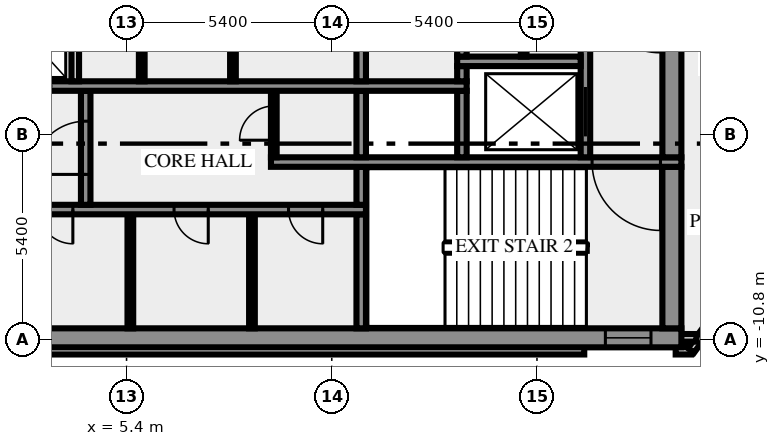
"""IFC4 building model, lengths in metres.
Left out: names, types, materials, properties, quantities, classifications, styles, units other than length and angle.
Written with IfcOpenShell. Run it as: python <this file> out.ifc"""

import sys

from ifc_helpers import new_model, si_unit, direction, frame, frame_2d, origin, place, context, subcontext, project, spatial, rectangle, extrude, element, fill, save


model = new_model("IFC4")
c1 = context("Model", 3, precision=1e-05, world=origin(), true_north=direction((0.0, 1.0)))
c2 = subcontext(c1, "Body", "Model", "MODEL_VIEW")
j1 = project(units=[si_unit("LENGTHUNIT", "METRE"), si_unit("PLANEANGLEUNIT", "RADIAN")], contexts=[c1])
p1 = place(None, origin())
s1 = spatial("IfcSite", under=j1, at=p1, CompositionType="ELEMENT")
p2 = place(p1, origin())
s2 = spatial("IfcBuilding", under=s1, at=p2, CompositionType="ELEMENT")
p3 = place(p2, frame((0.0, 0.0, 319.0)))
s3 = spatial("IfcBuildingStorey", under=s2, at=p3, CompositionType="ELEMENT", Elevation=319.0)
p4 = place(p3, frame((-17.444, -11.088, 0.0), z_axis=(0.0, 0.0, 1.0), x_axis=(1.0, 0.0, 0.0)))
e1 = element("IfcWall", 1, at=p4, inside=s3, PredefinedType="SOLIDWALL", context=c2, shape_type="SweptSolid", body=[
    extrude(rectangle(XDim=34.888, YDim=0.2, at=frame_2d((17.444, 0.0))), origin(), (0.0, 0.0, 1.0), 3.65),
])
p5 = place(p3, frame((19.85, -11.088, 0.0), z_axis=(0.0, 0.0, 1.0), x_axis=(1.0, 0.0, 0.0)))
e2 = element("IfcWall", 2, at=p5, inside=s3, PredefinedType="SOLIDWALL", context=c2, shape_type="SweptSolid", body=[
    extrude(rectangle(XDim=0.406, YDim=0.2, at=frame_2d((0.203, 0.0))), origin(), (0.0, 0.0, 1.0), 3.65),
])
p6 = place(p3, frame((20.253, -11.083, 0.0), z_axis=(0.0, 0.0, 1.0), x_axis=(0.587766567315, 0.809030569476, 0.0)))
e3 = element("IfcWall", 3, at=p6, inside=s3, PredefinedType="SOLIDWALL", context=c2, shape_type="SweptSolid", body=[
    extrude(rectangle(XDim=2.688, YDim=0.2, at=frame_2d((1.344, 0.0))), origin(), (0.0, 0.0, 1.0), 3.65),
])
p7 = place(p3, frame((19.98, -10.75, 0.0), z_axis=(0.0, 0.0, 1.0), x_axis=(1.0, 0.0, 0.0)))
e4 = element("IfcWall", 4, at=p7, inside=s3, PredefinedType="SOLIDWALL", context=c2, shape_type="SweptSolid", body=[
    extrude(rectangle(XDim=0.417, YDim=0.2, at=frame_2d((0.208, 0.0))), origin(), (0.0, 0.0, 1.0), 3.65),
])
p8 = place(p3, frame((-20.0, -10.75, 0.0), z_axis=(0.0, 0.0, 1.0), x_axis=(1.0, 0.0, 0.0)))
e5 = element("IfcWall", 5, at=p8, inside=s3, PredefinedType="SHEAR", context=c2, shape_type="SweptSolid", body=[
    extrude(rectangle(XDim=40.0, YDim=0.5, at=frame_2d((20.0, 0.0))), origin(), (0.0, 0.0, 1.0), 3.65),
])
p9 = place(p8, frame((0.8, 0.0, 1.0)))
e6 = element("IfcOpeningElement", 6, at=p9, cuts=e5, PredefinedType="OPENING", context=c2, shape_type="SweptSolid", body=[
    extrude(rectangle(XDim=1.2, YDim=1.2, at=frame_2d((0.6, 0.6))), frame((0.0, 0.26, 0.0), z_axis=(0.0, -1.0, 0.0), x_axis=(1.0, 0.0, 0.0)), (0.0, 0.0, 1.0), 0.52),
])
p10 = place(p8, frame((38.0, 0.0, 1.0)))
e7 = element("IfcOpeningElement", 7, at=p10, cuts=e5, PredefinedType="OPENING", context=c2, shape_type="SweptSolid", body=[
    extrude(rectangle(XDim=1.2, YDim=1.2, at=frame_2d((0.6, 0.6))), frame((0.0, 0.26, 0.0), z_axis=(0.0, -1.0, 0.0), x_axis=(1.0, 0.0, 0.0)), (0.0, 0.0, 1.0), 0.52),
])
for number, where, z_axis, x_axis in (
    (8, (5.5, -10.5, 0.0), (0.0, 0.0, 1.0), (0.0, 1.0, 0.0)),
    (9, (8.7, -10.5, 0.0), (0.0, 0.0, 1.0), (0.0, 1.0, 0.0)),
):
    element("IfcWall", number, at=place(p3, frame(where, z_axis=z_axis, x_axis=x_axis)), inside=s3, PredefinedType="PARTITIONING", context=c2, shape_type="SweptSolid", body=[
        extrude(rectangle(XDim=3.0, YDim=0.15, at=frame_2d((1.5, 0.0))), origin(), (0.0, 0.0, 1.0), 3.65),
    ])
p11 = place(p3, frame((11.575, -10.5, 0.0), z_axis=(0.0, 0.0, 1.0), x_axis=(0.0, 1.0, 0.0)))
e10 = element("IfcWall", 10, at=p11, inside=s3, PredefinedType="SHEAR", context=c2, shape_type="SweptSolid", body=[
    extrude(rectangle(XDim=3.0, YDim=0.25, at=frame_2d((1.5, 0.0))), origin(), (0.0, 0.0, 1.0), 3.65),
])
p12 = place(p3, frame((19.75, -10.5, 0.0), z_axis=(0.0, 0.0, 1.0), x_axis=(0.0, 1.0, 0.0)))
e11 = element("IfcWall", 11, at=p12, inside=s3, PredefinedType="SHEAR", context=c2, shape_type="SweptSolid", body=[
    extrude(rectangle(XDim=4.25, YDim=0.5, at=frame_2d((2.125, 0.0))), origin(), (0.0, 0.0, 1.0), 3.65),
])
p13 = place(p3, frame((11.7, -7.375, 0.0), z_axis=(0.0, 0.0, 1.0), x_axis=(-1.0, 0.0, 0.0)))
e12 = element("IfcWall", 12, at=p13, inside=s3, PredefinedType="SHEAR", context=c2, shape_type="SweptSolid", body=[
    extrude(rectangle(XDim=23.4, YDim=0.25, at=frame_2d((11.7, 0.0))), origin(), (0.0, 0.0, 1.0), 3.65),
])
p14 = place(p13, frame((22.225, 0.0, 0.0)))
e13 = element("IfcOpeningElement", 13, at=p14, cuts=e12, PredefinedType="OPENING", context=c2, shape_type="SweptSolid", body=[
    extrude(rectangle(XDim=0.8, YDim=2.1, at=frame_2d((0.4, 1.05))), frame((0.0, 0.135, 0.0), z_axis=(0.0, -1.0, 0.0), x_axis=(1.0, 0.0, 0.0)), (0.0, 0.0, 1.0), 0.27),
])
p15 = place(p13, frame((20.2, 0.0, 0.0)))
e14 = element("IfcOpeningElement", 14, at=p15, cuts=e12, PredefinedType="OPENING", context=c2, shape_type="SweptSolid", body=[
    extrude(rectangle(XDim=1.1, YDim=2.1, at=frame_2d((0.55, 1.05))), frame((0.0, 0.135, 0.0), z_axis=(0.0, -1.0, 0.0), x_axis=(1.0, 0.0, 0.0)), (0.0, 0.0, 1.0), 0.27),
])
p16 = place(p13, frame((17.7, 0.0, 0.0)))
e15 = element("IfcOpeningElement", 15, at=p16, cuts=e12, PredefinedType="OPENING", context=c2, shape_type="SweptSolid", body=[
    extrude(rectangle(XDim=1.1, YDim=2.1, at=frame_2d((0.55, 1.05))), frame((0.0, 0.135, 0.0), z_axis=(0.0, -1.0, 0.0), x_axis=(1.0, 0.0, 0.0)), (0.0, 0.0, 1.0), 0.27),
])
p17 = place(p13, frame((15.975, 0.0, 0.0)))
e16 = element("IfcOpeningElement", 16, at=p17, cuts=e12, PredefinedType="OPENING", context=c2, shape_type="SweptSolid", body=[
    extrude(rectangle(XDim=0.8, YDim=2.1, at=frame_2d((0.4, 1.05))), frame((0.0, 0.135, 0.0), z_axis=(0.0, -1.0, 0.0), x_axis=(1.0, 0.0, 0.0)), (0.0, 0.0, 1.0), 0.27),
])
p18 = place(p13, frame((14.5, 0.0, 0.0)))
e17 = element("IfcOpeningElement", 17, at=p18, cuts=e12, PredefinedType="OPENING", context=c2, shape_type="SweptSolid", body=[
    extrude(rectangle(XDim=0.9, YDim=2.1, at=frame_2d((0.45, 1.05))), frame((0.0, 0.135, 0.0), z_axis=(0.0, -1.0, 0.0), x_axis=(1.0, 0.0, 0.0)), (0.0, 0.0, 1.0), 0.27),
])
p19 = place(p13, frame((12.95, 0.0, 0.0)))
e18 = element("IfcOpeningElement", 18, at=p19, cuts=e12, PredefinedType="OPENING", context=c2, shape_type="SweptSolid", body=[
    extrude(rectangle(XDim=0.9, YDim=2.1, at=frame_2d((0.45, 1.05))), frame((0.0, 0.135, 0.0), z_axis=(0.0, -1.0, 0.0), x_axis=(1.0, 0.0, 0.0)), (0.0, 0.0, 1.0), 0.27),
])
p20 = place(p13, frame((11.475, 0.0, 0.0)))
e19 = element("IfcOpeningElement", 19, at=p20, cuts=e12, PredefinedType="OPENING", context=c2, shape_type="SweptSolid", body=[
    extrude(rectangle(XDim=0.9, YDim=2.1, at=frame_2d((0.45, 1.05))), frame((0.0, 0.135, 0.0), z_axis=(0.0, -1.0, 0.0), x_axis=(1.0, 0.0, 0.0)), (0.0, 0.0, 1.0), 0.27),
])
p21 = place(p13, frame((10.45, 0.0, 0.0)))
e20 = element("IfcOpeningElement", 20, at=p21, cuts=e12, PredefinedType="OPENING", context=c2, shape_type="SweptSolid", body=[
    extrude(rectangle(XDim=0.5, YDim=2.1, at=frame_2d((0.25, 1.05))), frame((0.0, 0.135, 0.0), z_axis=(0.0, -1.0, 0.0), x_axis=(1.0, 0.0, 0.0)), (0.0, 0.0, 1.0), 0.27),
])
p22 = place(p13, frame((7.713, 0.0, 0.0)))
e21 = element("IfcOpeningElement", 21, at=p22, cuts=e12, PredefinedType="OPENING", context=c2, shape_type="SweptSolid", body=[
    extrude(rectangle(XDim=0.9, YDim=2.1, at=frame_2d((0.45, 1.05))), frame((0.0, 0.135, 0.0), z_axis=(0.0, -1.0, 0.0), x_axis=(1.0, 0.0, 0.0)), (0.0, 0.0, 1.0), 0.27),
])
p23 = place(p13, frame((4.15, 0.0, 0.0)))
e22 = element("IfcOpeningElement", 22, at=p23, cuts=e12, PredefinedType="OPENING", context=c2, shape_type="SweptSolid", body=[
    extrude(rectangle(XDim=0.9, YDim=2.1, at=frame_2d((0.45, 1.05))), frame((0.0, 0.135, 0.0), z_axis=(0.0, -1.0, 0.0), x_axis=(1.0, 0.0, 0.0)), (0.0, 0.0, 1.0), 0.27),
])
p24 = place(p13, frame((1.138, 0.0, 0.0)))
e23 = element("IfcOpeningElement", 23, at=p24, cuts=e12, PredefinedType="OPENING", context=c2, shape_type="SweptSolid", body=[
    extrude(rectangle(XDim=0.9, YDim=2.1, at=frame_2d((0.45, 1.05))), frame((0.0, 0.135, 0.0), z_axis=(0.0, -1.0, 0.0), x_axis=(1.0, 0.0, 0.0)), (0.0, 0.0, 1.0), 0.27),
])
p25 = place(p3, frame((4.325, -7.25, 0.0), z_axis=(0.0, 0.0, 1.0), x_axis=(0.0, 1.0, 0.0)))
e24 = element("IfcWall", 24, at=p25, inside=s3, PredefinedType="SHEAR", context=c2, shape_type="SweptSolid", body=[
    extrude(rectangle(XDim=3.0, YDim=0.25, at=frame_2d((1.5, 0.0))), origin(), (0.0, 0.0, 1.0), 3.65),
])
p26 = place(p25, frame((0.8, 0.0, 0.0)))
e25 = element("IfcOpeningElement", 25, at=p26, cuts=e24, PredefinedType="OPENING", context=c2, shape_type="SweptSolid", body=[
    extrude(rectangle(XDim=1.4, YDim=2.1, at=frame_2d((0.7, 1.05))), frame((0.0, 0.135, 0.0), z_axis=(0.0, -1.0, 0.0), x_axis=(1.0, 0.0, 0.0)), (0.0, 0.0, 1.0), 0.27),
])
p27 = place(p3, frame((11.575, -7.25, 0.0), z_axis=(0.0, 0.0, 1.0), x_axis=(0.0, 1.0, 0.0)))
e26 = element("IfcWall", 26, at=p27, inside=s3, PredefinedType="SHEAR", context=c2, shape_type="SweptSolid", body=[
    extrude(rectangle(XDim=1.0, YDim=0.25, at=frame_2d((0.5, 0.0))), origin(), (0.0, 0.0, 1.0), 3.65),
])
p28 = place(p3, frame((20.0, -6.125, 0.0), z_axis=(0.0, 0.0, 1.0), x_axis=(-1.0, 0.0, 0.0)))
e27 = element("IfcWall", 27, at=p28, inside=s3, PredefinedType="SHEAR", context=c2, shape_type="SweptSolid", body=[
    extrude(rectangle(XDim=10.8, YDim=0.25, at=frame_2d((5.4, 0.0))), origin(), (0.0, 0.0, 1.0), 3.65),
])
p29 = place(p28, frame((0.55, 0.0, 0.0)))
e28 = element("IfcOpeningElement", 28, at=p29, cuts=e27, PredefinedType="OPENING", context=c2, shape_type="SweptSolid", body=[
    extrude(rectangle(XDim=1.8, YDim=2.1, at=frame_2d((0.9, 1.05))), frame((0.0, 0.135, 0.0), z_axis=(0.0, -1.0, 0.0), x_axis=(1.0, 0.0, 0.0)), (0.0, 0.0, 1.0), 0.27),
])
p30 = place(p3, frame((9.275, -6.0, 0.0), z_axis=(0.0, 0.0, 1.0), x_axis=(0.0, 1.0, 0.0)))
e29 = element("IfcWall", 29, at=p30, inside=s3, PredefinedType="PARTITIONING", context=c2, shape_type="SweptSolid", body=[
    extrude(rectangle(XDim=1.75, YDim=0.15, at=frame_2d((0.875, 0.0))), origin(), (0.0, 0.0, 1.0), 3.65),
])
p31 = place(p30, frame((0.45, 0.0, 0.0)))
e30 = element("IfcOpeningElement", 30, at=p31, cuts=e29, PredefinedType="OPENING", context=c2, shape_type="SweptSolid", body=[
    extrude(rectangle(XDim=0.9, YDim=2.1, at=frame_2d((0.45, 1.05))), frame((0.0, 0.085, 0.0), z_axis=(0.0, -1.0, 0.0), x_axis=(1.0, 0.0, 0.0)), (0.0, 0.0, 1.0), 0.17),
])
for number, where, z_axis, x_axis in (
    (31, (11.575, -6.0, 0.0), (0.0, 0.0, 1.0), (0.0, 1.0, 0.0)),
    (32, (14.225, -6.0, 0.0), (0.0, 0.0, 1.0), (0.0, 1.0, 0.0)),
):
    element("IfcWall", number, at=place(p3, frame(where, z_axis=z_axis, x_axis=x_axis)), inside=s3, PredefinedType="SHEAR", context=c2, shape_type="SweptSolid", body=[
        extrude(rectangle(XDim=1.75, YDim=0.25, at=frame_2d((0.875, 0.0))), origin(), (0.0, 0.0, 1.0), 3.65),
    ])
p32 = place(p3, frame((17.475, -6.0, 0.0), z_axis=(0.0, 0.0, 1.0), x_axis=(0.0, 1.0, 0.0)))
e33 = element("IfcWall", 33, at=p32, inside=s3, PredefinedType="SHEAR", context=c2, shape_type="SweptSolid", body=[
    extrude(rectangle(XDim=4.3, YDim=0.25, at=frame_2d((2.15, 0.0))), origin(), (0.0, 0.0, 1.0), 3.65),
])
p33 = place(p32, frame((0.55, 0.0, 0.0)))
e34 = element("IfcOpeningElement", 34, at=p33, cuts=e33, PredefinedType="OPENING", context=c2, shape_type="SweptSolid", body=[
    extrude(rectangle(XDim=1.3, YDim=2.1, at=frame_2d((0.65, 1.05))), frame((0.0, 0.135, 0.0), z_axis=(0.0, -1.0, 0.0), x_axis=(1.0, 0.0, 0.0)), (0.0, 0.0, 1.0), 0.27),
])
p34 = place(p3, frame((19.75, -6.0, 0.0), z_axis=(0.0, 0.0, 1.0), x_axis=(0.0, 1.0, 0.0)))
e35 = element("IfcWall", 35, at=p34, inside=s3, PredefinedType="SHEAR", context=c2, shape_type="SweptSolid", body=[
    extrude(rectangle(XDim=4.3, YDim=0.5, at=frame_2d((2.15, 0.0))), origin(), (0.0, 0.0, 1.0), 3.65),
])
p35 = place(p3, frame((-0.6, -4.125, 0.0), z_axis=(0.0, 0.0, 1.0), x_axis=(1.0, 0.0, 0.0)))
e36 = element("IfcWall", 36, at=p35, inside=s3, PredefinedType="SHEAR", context=c2, shape_type="SweptSolid", body=[
    extrude(rectangle(XDim=14.95, YDim=0.25, at=frame_2d((7.475, 0.0))), origin(), (0.0, 0.0, 1.0), 3.65),
])
p36 = place(p35, frame((2.75, 0.0, 0.0)))
e37 = element("IfcOpeningElement", 37, at=p36, cuts=e36, PredefinedType="OPENING", context=c2, shape_type="SweptSolid", body=[
    extrude(rectangle(XDim=1.3, YDim=2.1, at=frame_2d((0.65, 1.05))), frame((0.0, 0.135, 0.0), z_axis=(0.0, -1.0, 0.0), x_axis=(1.0, 0.0, 0.0)), (0.0, 0.0, 1.0), 0.27),
])
p37 = place(p3, frame((4.05, -4.0, 0.0), z_axis=(0.0, 0.0, 1.0), x_axis=(0.0, 1.0, 0.0)))
e38 = element("IfcWall", 38, at=p37, inside=s3, PredefinedType="SOLIDWALL", context=c2, shape_type="SweptSolid", body=[
    extrude(rectangle(XDim=2.3, YDim=0.2, at=frame_2d((1.15, 0.0))), origin(), (0.0, 0.0, 1.0), 3.65),
])
for number, where, z_axis, x_axis in (
    (39, (5.8, -4.0, 0.0), (0.0, 0.0, 1.0), (0.0, 1.0, 0.0)),
    (40, (8.2, -4.0, 0.0), (0.0, 0.0, 1.0), (0.0, 1.0, 0.0)),
):
    element("IfcWall", number, at=place(p3, frame(where, z_axis=z_axis, x_axis=x_axis)), inside=s3, PredefinedType="PARTITIONING", context=c2, shape_type="SweptSolid", body=[
        extrude(rectangle(XDim=2.3, YDim=0.15, at=frame_2d((1.15, 0.0))), origin(), (0.0, 0.0, 1.0), 3.65),
    ])
p38 = place(p3, frame((11.575, -4.0, 0.0), z_axis=(0.0, 0.0, 1.0), x_axis=(0.0, 1.0, 0.0)))
e41 = element("IfcWall", 41, at=p38, inside=s3, PredefinedType="SHEAR", context=c2, shape_type="SweptSolid", body=[
    extrude(rectangle(XDim=2.3, YDim=0.25, at=frame_2d((1.15, 0.0))), origin(), (0.0, 0.0, 1.0), 3.65),
])
p39 = place(p3, frame((14.225, -4.0, 0.0), z_axis=(0.0, 0.0, 1.0), x_axis=(0.0, 1.0, 0.0)))
e42 = element("IfcWall", 42, at=p39, inside=s3, PredefinedType="SHEAR", context=c2, shape_type="SweptSolid", body=[
    extrude(rectangle(XDim=0.4, YDim=0.25, at=frame_2d((0.2, 0.0))), origin(), (0.0, 0.0, 1.0), 3.65),
])
p40 = place(p3, frame((14.1, -3.475, 0.0), z_axis=(0.0, 0.0, 1.0), x_axis=(1.0, 0.0, 0.0)))
e43 = element("IfcWall", 43, at=p40, inside=s3, PredefinedType="SHEAR", context=c2, shape_type="SweptSolid", body=[
    extrude(rectangle(XDim=3.25, YDim=0.25, at=frame_2d((1.625, 0.0))), origin(), (0.0, 0.0, 1.0), 3.65),
])
p41 = place(p3, frame((14.225, -3.35, 0.0), z_axis=(0.0, 0.0, 1.0), x_axis=(0.0, 1.0, 0.0)))
e44 = element("IfcWall", 44, at=p41, inside=s3, PredefinedType="SHEAR", context=c2, shape_type="SweptSolid", body=[
    extrude(rectangle(XDim=1.65, YDim=0.25, at=frame_2d((0.825, 0.0))), origin(), (0.0, 0.0, 1.0), 3.65),
])
p42 = place(p3, frame((15.85, -3.35, 0.0), z_axis=(0.0, 0.0, 1.0), x_axis=(0.0, 1.0, 0.0)))
e45 = element("IfcWall", 45, at=p42, inside=s3, PredefinedType="PARTITIONING", context=c2, shape_type="SweptSolid", body=[
    extrude(rectangle(XDim=1.65, YDim=0.15, at=frame_2d((0.825, 0.0))), origin(), (0.0, 0.0, 1.0), 3.65),
])
p43 = place(p10, origin())
e46 = element("IfcWindow", 46, at=p43, inside=s3, PartitioningType="SINGLE_PANEL", PredefinedType="WINDOW", context=c2, shape_type="SweptSolid", body=[
    extrude(rectangle(XDim=1.2, YDim=1.2, at=frame_2d((0.6, 0.6))), frame((0.0, 0.03, 0.0), z_axis=(0.0, -1.0, 0.0), x_axis=(1.0, 0.0, 0.0)), (0.0, 0.0, 1.0), 0.06),
])
fill(e7, e46)
p44 = place(p22, origin())
e47 = element("IfcDoor", 47, at=p44, inside=s3, OperationType="SINGLE_SWING_LEFT", PredefinedType="DOOR", context=c2, shape_type="SweptSolid", body=[
    extrude(rectangle(XDim=0.9, YDim=2.1, at=frame_2d((0.45, 1.05))), frame((0.0, 0.025, 0.0), z_axis=(0.0, -1.0, 0.0), x_axis=(1.0, 0.0, 0.0)), (0.0, 0.0, 1.0), 0.05),
])
fill(e21, e47)
p45 = place(p23, origin())
e48 = element("IfcDoor", 48, at=p45, inside=s3, OperationType="SINGLE_SWING_LEFT", PredefinedType="DOOR", context=c2, shape_type="SweptSolid", body=[
    extrude(rectangle(XDim=0.9, YDim=2.1, at=frame_2d((0.45, 1.05))), frame((0.0, 0.025, 0.0), z_axis=(0.0, -1.0, 0.0), x_axis=(1.0, 0.0, 0.0)), (0.0, 0.0, 1.0), 0.05),
])
fill(e22, e48)
p46 = place(p24, origin())
e49 = element("IfcDoor", 49, at=p46, inside=s3, OperationType="SINGLE_SWING_LEFT", PredefinedType="DOOR", context=c2, shape_type="SweptSolid", body=[
    extrude(rectangle(XDim=0.9, YDim=2.1, at=frame_2d((0.45, 1.05))), frame((0.0, 0.025, 0.0), z_axis=(0.0, -1.0, 0.0), x_axis=(1.0, 0.0, 0.0)), (0.0, 0.0, 1.0), 0.05),
])
fill(e23, e49)
p47 = place(p26, origin())
e50 = element("IfcDoor", 50, at=p47, inside=s3, OperationType="DOUBLE_DOOR_SINGLE_SWING", PredefinedType="DOOR", context=c2, shape_type="SweptSolid", body=[
    extrude(rectangle(XDim=1.4, YDim=2.1, at=frame_2d((0.7, 1.05))), frame((0.0, 0.025, 0.0), z_axis=(0.0, -1.0, 0.0), x_axis=(1.0, 0.0, 0.0)), (0.0, 0.0, 1.0), 0.05),
])
fill(e25, e50)
p48 = place(p29, origin())
e51 = element("IfcDoor", 51, at=p48, inside=s3, OperationType="DOUBLE_DOOR_SINGLE_SWING", PredefinedType="DOOR", context=c2, shape_type="SweptSolid", body=[
    extrude(rectangle(XDim=1.8, YDim=2.1, at=frame_2d((0.9, 1.05))), frame((0.0, 0.025, 0.0), z_axis=(0.0, -1.0, 0.0), x_axis=(1.0, 0.0, 0.0)), (0.0, 0.0, 1.0), 0.05),
])
fill(e28, e51)
p49 = place(p31, origin())
e52 = element("IfcDoor", 52, at=p49, inside=s3, OperationType="SINGLE_SWING_RIGHT", PredefinedType="DOOR", context=c2, shape_type="SweptSolid", body=[
    extrude(rectangle(XDim=0.9, YDim=2.1, at=frame_2d((0.45, 1.05))), frame((0.0, 0.025, 0.0), z_axis=(0.0, -1.0, 0.0), x_axis=(1.0, 0.0, 0.0)), (0.0, 0.0, 1.0), 0.05),
])
fill(e30, e52)
p50 = place(p33, origin())
e53 = element("IfcDoor", 53, at=p50, inside=s3, OperationType="DOUBLE_DOOR_SLIDING", PredefinedType="DOOR", context=c2, shape_type="SweptSolid", body=[
    extrude(rectangle(XDim=1.3, YDim=2.1, at=frame_2d((0.65, 1.05))), frame((0.0, 0.025, 0.0), z_axis=(0.0, -1.0, 0.0), x_axis=(1.0, 0.0, 0.0)), (0.0, 0.0, 1.0), 0.05),
])
fill(e34, e53)
save(model, sys.argv[1])
